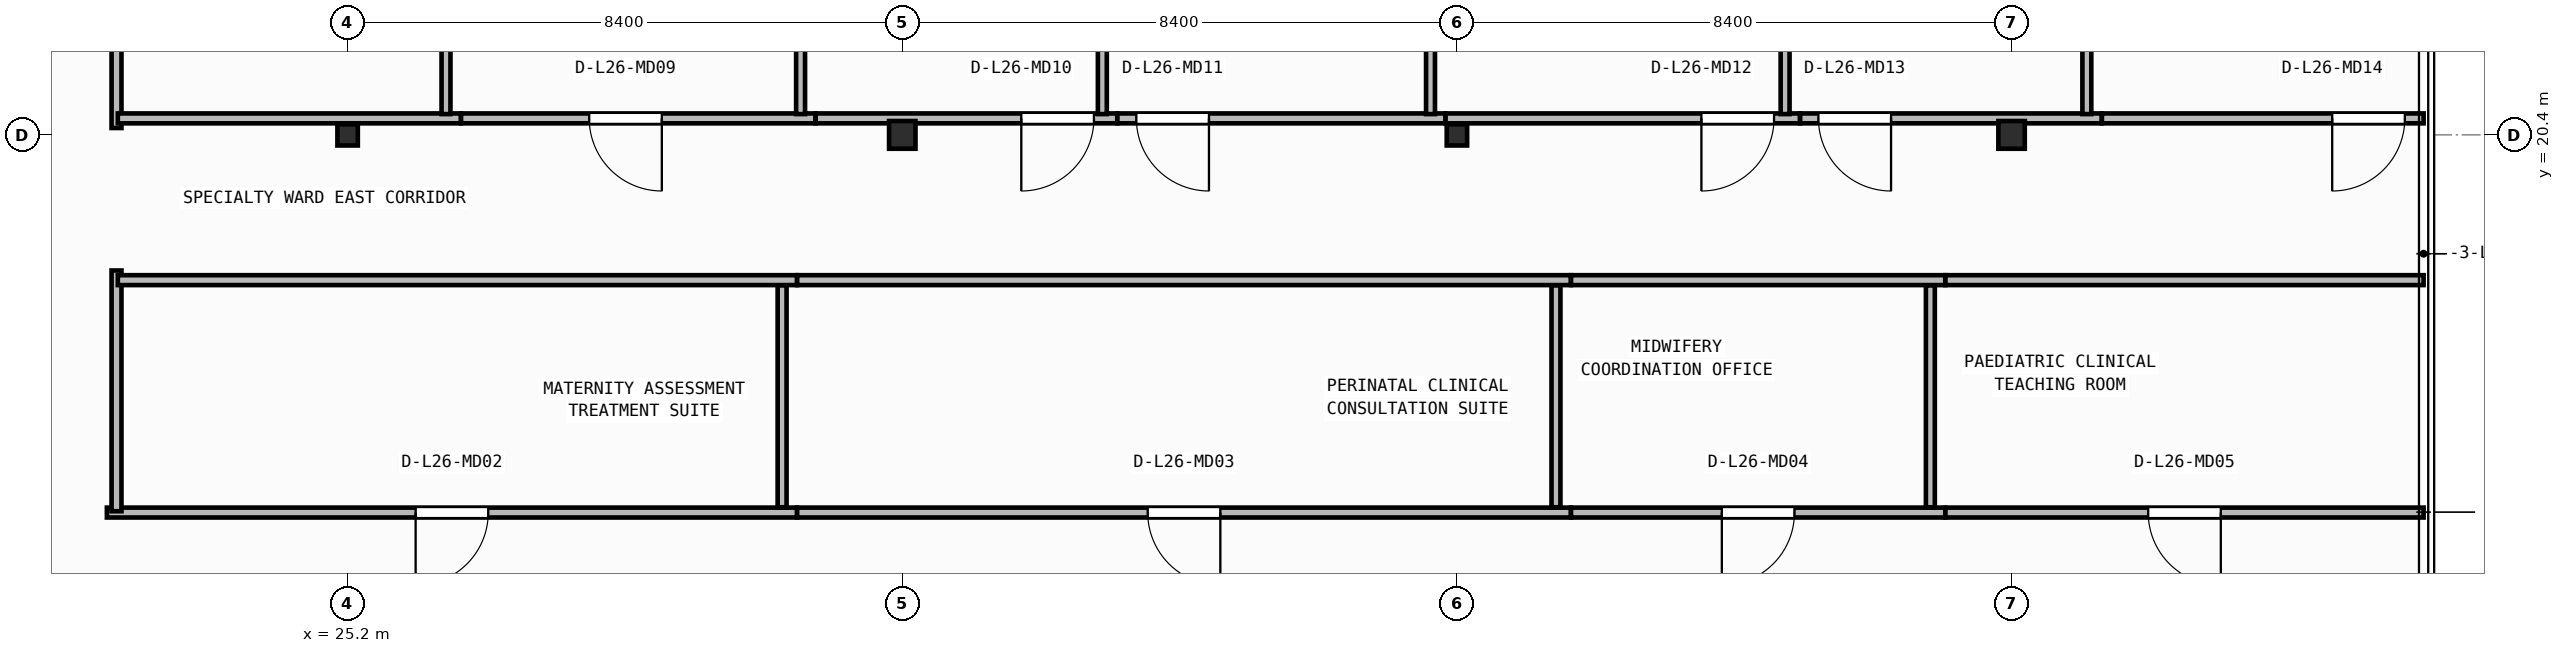
"""IFC4 building model, lengths in metres.
Left out: names, types, materials, properties, quantities, classifications, styles, units other than length and angle.
Written with IfcOpenShell. Run it as: python <this file> out.ifc"""

import sys

from ifc_helpers import new_model, si_unit, direction, frame, frame_2d, origin, origin_2d, place, context, subcontext, project, spatial, rectangle, i_section, extrude, element, fill, save


model = new_model("IFC4")
c1 = context("Model", 3, precision=1e-05, world=origin(), true_north=direction((0.0, 1.0)))
c2 = subcontext(c1, "Body", "Model", "MODEL_VIEW")
j1 = project(units=[si_unit("LENGTHUNIT", "METRE"), si_unit("PLANEANGLEUNIT", "RADIAN")], contexts=[c1])
p1 = place(None, origin())
s1 = spatial("IfcSite", under=j1, at=p1, CompositionType="ELEMENT")
p2 = place(p1, origin())
s2 = spatial("IfcBuilding", under=s1, at=p2, CompositionType="ELEMENT")
p3 = place(p2, frame((0.0, 0.0, 107.3)))
s3 = spatial("IfcBuildingStorey", under=s2, at=p3, CompositionType="ELEMENT", Elevation=107.3)
p4 = place(p3, frame((25.2, 20.4, 0.0), z_axis=(0.0, 0.0, 1.0), x_axis=(1.0, 0.0, 0.0)))
e1 = element("IfcColumn", 1, at=p4, inside=s3, PredefinedType="COLUMN", context=c2, shape_type="SweptSolid", body=[
    extrude(i_section(OverallWidth=0.309, OverallDepth=0.321, WebThickness=0.014, FlangeThickness=0.022, FilletRadius=0.017, at=origin_2d()), origin(), (0.0, 0.0, 1.0), 3.95),
])
p5 = place(p3, frame((33.6, 20.4, 0.0), z_axis=(0.0, 0.0, 1.0), x_axis=(1.0, 0.0, 0.0)))
e2 = element("IfcColumn", 2, at=p5, inside=s3, PredefinedType="COLUMN", context=c2, shape_type="SweptSolid", body=[
    extrude(i_section(OverallWidth=0.4, OverallDepth=0.42, WebThickness=0.025, FlangeThickness=0.04, at=origin_2d()), origin(), (0.0, 0.0, 1.0), 3.95),
])
p6 = place(p3, frame((42.0, 20.4, 0.0), z_axis=(0.0, 0.0, 1.0), x_axis=(1.0, 0.0, 0.0)))
e3 = element("IfcColumn", 3, at=p6, inside=s3, PredefinedType="COLUMN", context=c2, shape_type="SweptSolid", body=[
    extrude(i_section(OverallWidth=0.309, OverallDepth=0.321, WebThickness=0.014, FlangeThickness=0.022, FilletRadius=0.017, at=origin_2d()), origin(), (0.0, 0.0, 1.0), 3.95),
])
p7 = place(p3, frame((50.4, 20.4, 0.0), z_axis=(0.0, 0.0, 1.0), x_axis=(1.0, 0.0, 0.0)))
e4 = element("IfcColumn", 4, at=p7, inside=s3, PredefinedType="COLUMN", context=c2, shape_type="SweptSolid", body=[
    extrude(i_section(OverallWidth=0.4, OverallDepth=0.42, WebThickness=0.025, FlangeThickness=0.04, at=origin_2d()), origin(), (0.0, 0.0, 1.0), 3.95),
])
p8 = place(p3, frame((32.006, 14.68, 0.0), z_axis=(0.0, 0.0, 1.0), x_axis=(-1.0, 0.0, 0.0)))
e5 = element("IfcWall", 5, at=p8, inside=s3, PredefinedType="PARTITIONING", context=c2, shape_type="SweptSolid", body=[
    extrude(rectangle(XDim=10.452, YDim=0.15, at=frame_2d((5.226, 0.0))), origin(), (0.0, 0.0, 1.0), 3.71),
])
p9 = place(p8, frame((4.676, 0.0, 0.0)))
e6 = element("IfcOpeningElement", 6, at=p9, cuts=e5, PredefinedType="OPENING", context=c2, shape_type="SweptSolid", body=[
    extrude(rectangle(XDim=1.1, YDim=2.1, at=frame_2d((0.55, 1.05))), frame((0.0, 0.085, 0.0), z_axis=(0.0, -1.0, 0.0), x_axis=(1.0, 0.0, 0.0)), (0.0, 0.0, 1.0), 0.17),
])
p10 = place(p3, frame((43.726, 14.68, 0.0), z_axis=(0.0, 0.0, 1.0), x_axis=(-1.0, 0.0, 0.0)))
e7 = element("IfcWall", 7, at=p10, inside=s3, PredefinedType="PARTITIONING", context=c2, shape_type="SweptSolid", body=[
    extrude(rectangle(XDim=11.718, YDim=0.15, at=frame_2d((5.859, 0.0))), origin(), (0.0, 0.0, 1.0), 3.71),
])
p11 = place(p10, frame((5.309, 0.0, 0.0)))
e8 = element("IfcOpeningElement", 8, at=p11, cuts=e7, PredefinedType="OPENING", context=c2, shape_type="SweptSolid", body=[
    extrude(rectangle(XDim=1.1, YDim=2.1, at=frame_2d((0.55, 1.05))), frame((0.0, 0.085, 0.0), z_axis=(0.0, -1.0, 0.0), x_axis=(1.0, 0.0, 0.0)), (0.0, 0.0, 1.0), 0.17),
])
p12 = place(p3, frame((49.396, 14.68, 0.0), z_axis=(0.0, 0.0, 1.0), x_axis=(-1.0, 0.0, 0.0)))
e9 = element("IfcWall", 9, at=p12, inside=s3, PredefinedType="PARTITIONING", context=c2, shape_type="SweptSolid", body=[
    extrude(rectangle(XDim=5.668, YDim=0.15, at=frame_2d((2.834, 0.0))), origin(), (0.0, 0.0, 1.0), 3.71),
])
p13 = place(p12, frame((2.284, 0.0, 0.0)))
e10 = element("IfcOpeningElement", 10, at=p13, cuts=e9, PredefinedType="OPENING", context=c2, shape_type="SweptSolid", body=[
    extrude(rectangle(XDim=1.1, YDim=2.1, at=frame_2d((0.55, 1.05))), frame((0.0, 0.085, 0.0), z_axis=(0.0, -1.0, 0.0), x_axis=(1.0, 0.0, 0.0)), (0.0, 0.0, 1.0), 0.17),
])
p14 = place(p3, frame((56.64, 14.68, 0.0), z_axis=(0.0, 0.0, 1.0), x_axis=(-1.0, 0.0, 0.0)))
e11 = element("IfcWall", 11, at=p14, inside=s3, PredefinedType="PARTITIONING", context=c2, shape_type="SweptSolid", body=[
    extrude(rectangle(XDim=7.242, YDim=0.15, at=frame_2d((3.621, 0.0))), origin(), (0.0, 0.0, 1.0), 3.71),
])
p15 = place(p14, frame((3.071, 0.0, 0.0)))
e12 = element("IfcOpeningElement", 12, at=p15, cuts=e11, PredefinedType="OPENING", context=c2, shape_type="SweptSolid", body=[
    extrude(rectangle(XDim=1.1, YDim=2.1, at=frame_2d((0.55, 1.05))), frame((0.0, 0.085, 0.0), z_axis=(0.0, -1.0, 0.0), x_axis=(1.0, 0.0, 0.0)), (0.0, 0.0, 1.0), 0.17),
])
p16 = place(p3, frame((21.7, 14.7, 0.0), z_axis=(0.0, 0.0, 1.0), x_axis=(0.0, 1.0, 0.0)))
e13 = element("IfcWall", 13, at=p16, inside=s3, PredefinedType="PARTITIONING", context=c2, shape_type="SweptSolid", body=[
    extrude(rectangle(XDim=3.646, YDim=0.15, at=frame_2d((1.823, 0.0))), origin(), (0.0, 0.0, 1.0), 3.71),
])
p17 = place(p3, frame((21.7, 20.504, 0.0), z_axis=(0.0, 0.0, 1.0), x_axis=(0.0, 1.0, 0.0)))
e14 = element("IfcWall", 14, at=p17, inside=s3, PredefinedType="PARTITIONING", context=c2, shape_type="SweptSolid", body=[
    extrude(rectangle(XDim=6.756, YDim=0.15, at=frame_2d((3.378, 0.0))), origin(), (0.0, 0.0, 1.0), 3.71),
])
p18 = place(p17, frame((2.828, 0.0, 0.0)))
e15 = element("IfcOpeningElement", 15, at=p18, cuts=e14, PredefinedType="OPENING", context=c2, shape_type="SweptSolid", body=[
    extrude(rectangle(XDim=1.1, YDim=2.1, at=frame_2d((0.55, 1.05))), frame((0.0, 0.085, 0.0), z_axis=(0.0, -1.0, 0.0), x_axis=(1.0, 0.0, 0.0)), (0.0, 0.0, 1.0), 0.17),
])
p19 = place(p3, frame((21.72, 18.2, 0.0), z_axis=(0.0, 0.0, 1.0), x_axis=(1.0, 0.0, 0.0)))
e16 = element("IfcWall", 16, at=p19, inside=s3, PredefinedType="PARTITIONING", context=c2, shape_type="SweptSolid", body=[
    extrude(rectangle(XDim=10.286, YDim=0.15, at=frame_2d((5.143, 0.0))), origin(), (0.0, 0.0, 1.0), 3.71),
])
p20 = place(p3, frame((32.008, 18.2, 0.0), z_axis=(0.0, 0.0, 1.0), x_axis=(1.0, 0.0, 0.0)))
e17 = element("IfcWall", 17, at=p20, inside=s3, PredefinedType="PARTITIONING", context=c2, shape_type="SweptSolid", body=[
    extrude(rectangle(XDim=11.718, YDim=0.15, at=frame_2d((5.859, 0.0))), origin(), (0.0, 0.0, 1.0), 3.71),
])
p21 = place(p3, frame((43.728, 18.2, 0.0), z_axis=(0.0, 0.0, 1.0), x_axis=(1.0, 0.0, 0.0)))
e18 = element("IfcWall", 18, at=p21, inside=s3, PredefinedType="PARTITIONING", context=c2, shape_type="SweptSolid", body=[
    extrude(rectangle(XDim=5.668, YDim=0.15, at=frame_2d((2.834, 0.0))), origin(), (0.0, 0.0, 1.0), 3.71),
])
p22 = place(p3, frame((49.398, 18.2, 0.0), z_axis=(0.0, 0.0, 1.0), x_axis=(1.0, 0.0, 0.0)))
e19 = element("IfcWall", 19, at=p22, inside=s3, PredefinedType="PARTITIONING", context=c2, shape_type="SweptSolid", body=[
    extrude(rectangle(XDim=7.242, YDim=0.15, at=frame_2d((3.621, 0.0))), origin(), (0.0, 0.0, 1.0), 3.71),
])
p23 = place(p3, frame((26.916, 20.65, 0.0), z_axis=(0.0, 0.0, 1.0), x_axis=(-1.0, 0.0, 0.0)))
e20 = element("IfcWall", 20, at=p23, inside=s3, PredefinedType="PARTITIONING", context=c2, shape_type="SweptSolid", body=[
    extrude(rectangle(XDim=5.196, YDim=0.15, at=frame_2d((2.598, 0.0))), origin(), (0.0, 0.0, 1.0), 3.083),
])
p24 = place(p3, frame((32.286, 20.65, 0.0), z_axis=(0.0, 0.0, 1.0), x_axis=(-1.0, 0.0, 0.0)))
e21 = element("IfcWall", 21, at=p24, inside=s3, PredefinedType="PARTITIONING", context=c2, shape_type="SweptSolid", body=[
    extrude(rectangle(XDim=5.368, YDim=0.15, at=frame_2d((2.684, 0.0))), origin(), (0.0, 0.0, 1.0), 3.083),
])
p25 = place(p24, frame((2.327, 0.0, 0.0)))
e22 = element("IfcOpeningElement", 22, at=p25, cuts=e21, PredefinedType="OPENING", context=c2, shape_type="SweptSolid", body=[
    extrude(rectangle(XDim=1.1, YDim=2.1, at=frame_2d((0.55, 1.05))), frame((0.0, 0.085, 0.0), z_axis=(0.0, -1.0, 0.0), x_axis=(1.0, 0.0, 0.0)), (0.0, 0.0, 1.0), 0.17),
])
p26 = place(p3, frame((36.856, 20.65, 0.0), z_axis=(0.0, 0.0, 1.0), x_axis=(-1.0, 0.0, 0.0)))
e23 = element("IfcWall", 23, at=p26, inside=s3, PredefinedType="PARTITIONING", context=c2, shape_type="SweptSolid", body=[
    extrude(rectangle(XDim=4.568, YDim=0.15, at=frame_2d((2.284, 0.0))), origin(), (0.0, 0.0, 1.0), 3.083),
])
p27 = place(p26, frame((0.354, 0.0, 0.0)))
e24 = element("IfcOpeningElement", 24, at=p27, cuts=e23, PredefinedType="OPENING", context=c2, shape_type="SweptSolid", body=[
    extrude(rectangle(XDim=1.1, YDim=2.1, at=frame_2d((0.55, 1.05))), frame((0.0, 0.085, 0.0), z_axis=(0.0, -1.0, 0.0), x_axis=(1.0, 0.0, 0.0)), (0.0, 0.0, 1.0), 0.17),
])
p28 = place(p3, frame((41.826, 20.65, 0.0), z_axis=(0.0, 0.0, 1.0), x_axis=(-1.0, 0.0, 0.0)))
e25 = element("IfcWall", 25, at=p28, inside=s3, PredefinedType="PARTITIONING", context=c2, shape_type="SweptSolid", body=[
    extrude(rectangle(XDim=4.968, YDim=0.15, at=frame_2d((2.484, 0.0))), origin(), (0.0, 0.0, 1.0), 3.083),
])
p29 = place(p28, frame((3.581, 0.0, 0.0)))
e26 = element("IfcOpeningElement", 26, at=p29, cuts=e25, PredefinedType="OPENING", context=c2, shape_type="SweptSolid", body=[
    extrude(rectangle(XDim=1.1, YDim=2.1, at=frame_2d((0.55, 1.05))), frame((0.0, 0.085, 0.0), z_axis=(0.0, -1.0, 0.0), x_axis=(1.0, 0.0, 0.0)), (0.0, 0.0, 1.0), 0.17),
])
p30 = place(p3, frame((47.196, 20.65, 0.0), z_axis=(0.0, 0.0, 1.0), x_axis=(-1.0, 0.0, 0.0)))
e27 = element("IfcWall", 27, at=p30, inside=s3, PredefinedType="PARTITIONING", context=c2, shape_type="SweptSolid", body=[
    extrude(rectangle(XDim=5.368, YDim=0.15, at=frame_2d((2.684, 0.0))), origin(), (0.0, 0.0, 1.0), 3.083),
])
p31 = place(p30, frame((0.393, 0.0, 0.0)))
e28 = element("IfcOpeningElement", 28, at=p31, cuts=e27, PredefinedType="OPENING", context=c2, shape_type="SweptSolid", body=[
    extrude(rectangle(XDim=1.1, YDim=2.1, at=frame_2d((0.55, 1.05))), frame((0.0, 0.085, 0.0), z_axis=(0.0, -1.0, 0.0), x_axis=(1.0, 0.0, 0.0)), (0.0, 0.0, 1.0), 0.17),
])
p32 = place(p3, frame((51.766, 20.65, 0.0), z_axis=(0.0, 0.0, 1.0), x_axis=(-1.0, 0.0, 0.0)))
e29 = element("IfcWall", 29, at=p32, inside=s3, PredefinedType="PARTITIONING", context=c2, shape_type="SweptSolid", body=[
    extrude(rectangle(XDim=4.568, YDim=0.15, at=frame_2d((2.284, 0.0))), origin(), (0.0, 0.0, 1.0), 3.083),
])
p33 = place(p32, frame((3.191, 0.0, 0.0)))
e30 = element("IfcOpeningElement", 30, at=p33, cuts=e29, PredefinedType="OPENING", context=c2, shape_type="SweptSolid", body=[
    extrude(rectangle(XDim=1.1, YDim=2.1, at=frame_2d((0.55, 1.05))), frame((0.0, 0.085, 0.0), z_axis=(0.0, -1.0, 0.0), x_axis=(1.0, 0.0, 0.0)), (0.0, 0.0, 1.0), 0.17),
])
p34 = place(p3, frame((56.64, 20.65, 0.0), z_axis=(0.0, 0.0, 1.0), x_axis=(-1.0, 0.0, 0.0)))
e31 = element("IfcWall", 31, at=p34, inside=s3, PredefinedType="PARTITIONING", context=c2, shape_type="SweptSolid", body=[
    extrude(rectangle(XDim=4.872, YDim=0.15, at=frame_2d((2.436, 0.0))), origin(), (0.0, 0.0, 1.0), 3.71),
])
p35 = place(p34, frame((0.284, 0.0, 0.0)))
e32 = element("IfcOpeningElement", 32, at=p35, cuts=e31, PredefinedType="OPENING", context=c2, shape_type="SweptSolid", body=[
    extrude(rectangle(XDim=1.1, YDim=2.1, at=frame_2d((0.55, 1.05))), frame((0.0, 0.085, 0.0), z_axis=(0.0, -1.0, 0.0), x_axis=(1.0, 0.0, 0.0)), (0.0, 0.0, 1.0), 0.17),
])
for number, where, z_axis, x_axis in (
    (33, (31.78, 14.76, 0.0), (0.0, 0.0, 1.0), (0.0, 1.0, 0.0)),
    (34, (43.5, 14.76, 0.0), (0.0, 0.0, 1.0), (0.0, 1.0, 0.0)),
    (35, (49.17, 14.76, 0.0), (0.0, 0.0, 1.0), (0.0, 1.0, 0.0)),
):
    element("IfcWall", number, at=place(p3, frame(where, z_axis=z_axis, x_axis=x_axis)), inside=s3, PredefinedType="PARTITIONING", context=c2, shape_type="SweptSolid", body=[
        extrude(rectangle(XDim=3.36, YDim=0.135, at=frame_2d((1.68, 0.0))), origin(), (0.0, 0.0, 1.0), 3.71),
    ])
for number, where, z_axis, x_axis in (
    (36, (26.69, 20.715, 0.0), (0.0, 0.0, 1.0), (0.0, 1.0, 0.0)),
    (37, (32.06, 20.715, 0.0), (0.0, 0.0, 1.0), (0.0, 1.0, 0.0)),
    (38, (36.63, 20.715, 0.0), (0.0, 0.0, 1.0), (0.0, 1.0, 0.0)),
):
    element("IfcWall", number, at=place(p3, frame(where, z_axis=z_axis, x_axis=x_axis)), inside=s3, PredefinedType="PARTITIONING", context=c2, shape_type="SweptSolid", body=[
        extrude(rectangle(XDim=6.385, YDim=0.135, at=frame_2d((3.192, 0.0))), origin(), (0.0, 0.0, 1.0), 3.71),
    ])
p36 = place(p3, frame((41.6, 20.715, 0.0), z_axis=(0.0, 0.0, 1.0), x_axis=(0.0, 1.0, 0.0)))
e39 = element("IfcWall", 39, at=p36, inside=s3, PredefinedType="PARTITIONING", context=c2, shape_type="SweptSolid", body=[
    extrude(rectangle(XDim=6.385, YDim=0.135, at=frame_2d((3.192, 0.0))), origin(), (0.0, 0.0, 1.0), 3.152),
])
for number, where, z_axis, x_axis in (
    (40, (46.97, 20.715, 0.0), (0.0, 0.0, 1.0), (0.0, 1.0, 0.0)),
    (41, (51.54, 20.715, 0.0), (0.0, 0.0, 1.0), (0.0, 1.0, 0.0)),
):
    element("IfcWall", number, at=place(p3, frame(where, z_axis=z_axis, x_axis=x_axis)), inside=s3, PredefinedType="PARTITIONING", context=c2, shape_type="SweptSolid", body=[
        extrude(rectangle(XDim=6.385, YDim=0.135, at=frame_2d((3.192, 0.0))), origin(), (0.0, 0.0, 1.0), 3.71),
    ])
p37 = place(p9, origin())
e42 = element("IfcDoor", 42, at=p37, inside=s3, OperationType="SINGLE_SWING_RIGHT", PredefinedType="DOOR", context=c2, shape_type="SweptSolid", body=[
    extrude(rectangle(XDim=1.1, YDim=2.1, at=frame_2d((0.55, 1.05))), frame((0.0, 0.025, 0.0), z_axis=(0.0, -1.0, 0.0), x_axis=(1.0, 0.0, 0.0)), (0.0, 0.0, 1.0), 0.05),
])
fill(e6, e42)
p38 = place(p11, origin())
e43 = element("IfcDoor", 43, at=p38, inside=s3, OperationType="SINGLE_SWING_LEFT", PredefinedType="DOOR", context=c2, shape_type="SweptSolid", body=[
    extrude(rectangle(XDim=1.1, YDim=2.1, at=frame_2d((0.55, 1.05))), frame((0.0, 0.025, 0.0), z_axis=(0.0, -1.0, 0.0), x_axis=(1.0, 0.0, 0.0)), (0.0, 0.0, 1.0), 0.05),
])
fill(e8, e43)
p39 = place(p13, origin())
e44 = element("IfcDoor", 44, at=p39, inside=s3, OperationType="SINGLE_SWING_RIGHT", PredefinedType="DOOR", context=c2, shape_type="SweptSolid", body=[
    extrude(rectangle(XDim=1.1, YDim=2.1, at=frame_2d((0.55, 1.05))), frame((0.0, 0.025, 0.0), z_axis=(0.0, -1.0, 0.0), x_axis=(1.0, 0.0, 0.0)), (0.0, 0.0, 1.0), 0.05),
])
fill(e10, e44)
p40 = place(p15, origin())
e45 = element("IfcDoor", 45, at=p40, inside=s3, OperationType="SINGLE_SWING_LEFT", PredefinedType="DOOR", context=c2, shape_type="SweptSolid", body=[
    extrude(rectangle(XDim=1.1, YDim=2.1, at=frame_2d((0.55, 1.05))), frame((0.0, 0.025, 0.0), z_axis=(0.0, -1.0, 0.0), x_axis=(1.0, 0.0, 0.0)), (0.0, 0.0, 1.0), 0.05),
])
fill(e12, e45)
p41 = place(p25, origin())
e46 = element("IfcDoor", 46, at=p41, inside=s3, OperationType="SINGLE_SWING_LEFT", PredefinedType="DOOR", context=c2, shape_type="SweptSolid", body=[
    extrude(rectangle(XDim=1.1, YDim=2.1, at=frame_2d((0.55, 1.05))), frame((0.0, 0.025, 0.0), z_axis=(0.0, -1.0, 0.0), x_axis=(1.0, 0.0, 0.0)), (0.0, 0.0, 1.0), 0.05),
])
fill(e22, e46)
p42 = place(p27, origin())
e47 = element("IfcDoor", 47, at=p42, inside=s3, OperationType="SINGLE_SWING_RIGHT", PredefinedType="DOOR", context=c2, shape_type="SweptSolid", body=[
    extrude(rectangle(XDim=1.1, YDim=2.1, at=frame_2d((0.55, 1.05))), frame((0.0, 0.025, 0.0), z_axis=(0.0, -1.0, 0.0), x_axis=(1.0, 0.0, 0.0)), (0.0, 0.0, 1.0), 0.05),
])
fill(e24, e47)
p43 = place(p29, origin())
e48 = element("IfcDoor", 48, at=p43, inside=s3, OperationType="SINGLE_SWING_LEFT", PredefinedType="DOOR", context=c2, shape_type="SweptSolid", body=[
    extrude(rectangle(XDim=1.1, YDim=2.1, at=frame_2d((0.55, 1.05))), frame((0.0, 0.025, 0.0), z_axis=(0.0, -1.0, 0.0), x_axis=(1.0, 0.0, 0.0)), (0.0, 0.0, 1.0), 0.05),
])
fill(e26, e48)
p44 = place(p31, origin())
e49 = element("IfcDoor", 49, at=p44, inside=s3, OperationType="SINGLE_SWING_RIGHT", PredefinedType="DOOR", context=c2, shape_type="SweptSolid", body=[
    extrude(rectangle(XDim=1.1, YDim=2.1, at=frame_2d((0.55, 1.05))), frame((0.0, 0.025, 0.0), z_axis=(0.0, -1.0, 0.0), x_axis=(1.0, 0.0, 0.0)), (0.0, 0.0, 1.0), 0.05),
])
fill(e28, e49)
p45 = place(p33, origin())
e50 = element("IfcDoor", 50, at=p45, inside=s3, OperationType="SINGLE_SWING_LEFT", PredefinedType="DOOR", context=c2, shape_type="SweptSolid", body=[
    extrude(rectangle(XDim=1.1, YDim=2.1, at=frame_2d((0.55, 1.05))), frame((0.0, 0.025, 0.0), z_axis=(0.0, -1.0, 0.0), x_axis=(1.0, 0.0, 0.0)), (0.0, 0.0, 1.0), 0.05),
])
fill(e30, e50)
p46 = place(p35, origin())
e51 = element("IfcDoor", 51, at=p46, inside=s3, OperationType="SINGLE_SWING_RIGHT", PredefinedType="DOOR", context=c2, shape_type="SweptSolid", body=[
    extrude(rectangle(XDim=1.1, YDim=2.1, at=frame_2d((0.55, 1.05))), frame((0.0, 0.025, 0.0), z_axis=(0.0, -1.0, 0.0), x_axis=(1.0, 0.0, 0.0)), (0.0, 0.0, 1.0), 0.05),
])
fill(e32, e51)
save(model, sys.argv[1])
